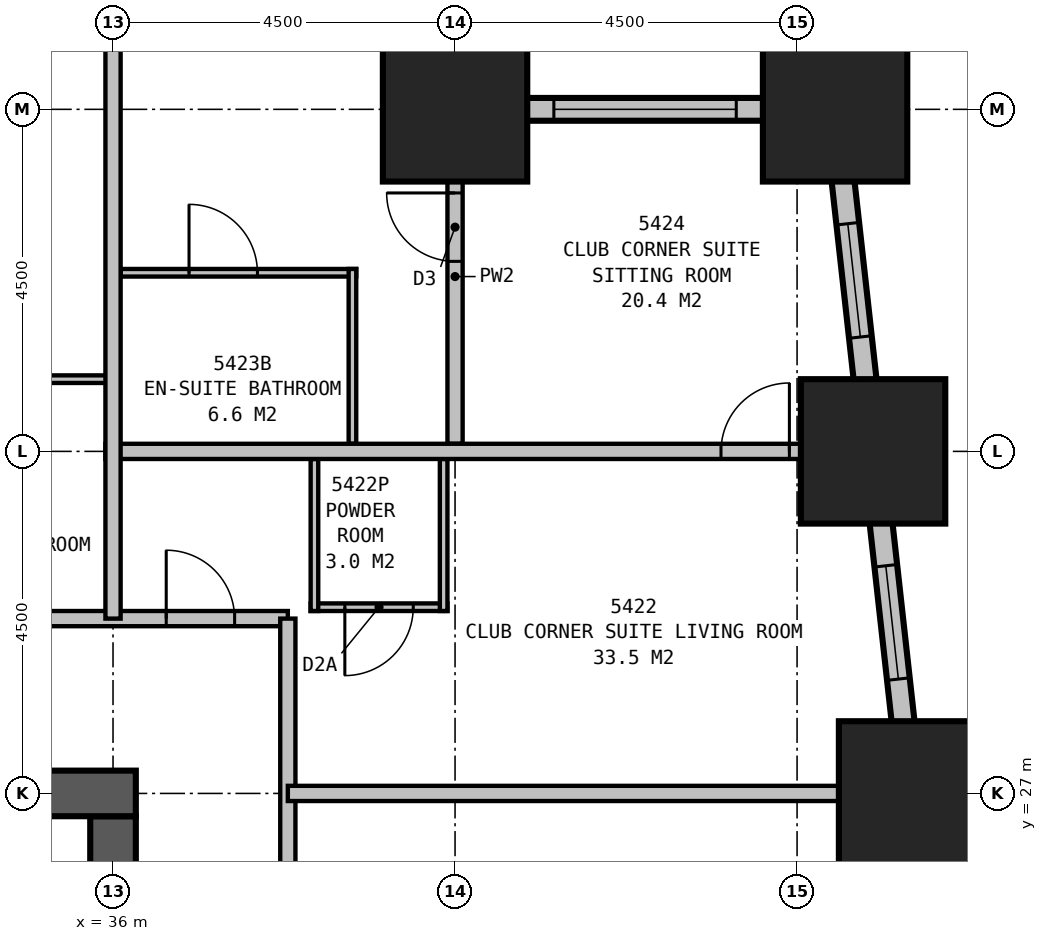
"""IFC4 building model, lengths in metres.
Left out: names, types, materials, properties, quantities, classifications, styles, units other than length and angle.
Written with IfcOpenShell. Run it as: python <this file> out.ifc"""

import sys

from ifc_helpers import new_model, si_unit, direction, frame, frame_2d, origin, origin_2d, place, context, subcontext, project, spatial, rectangle, extrude, element, fill, save


model = new_model("IFC4")
c1 = context("Model", 3, precision=1e-05, world=origin(), true_north=direction((0.0, 1.0)))
c2 = subcontext(c1, "Body", "Model", "MODEL_VIEW")
j1 = project(units=[si_unit("LENGTHUNIT", "METRE"), si_unit("PLANEANGLEUNIT", "RADIAN")], contexts=[c1])
p1 = place(None, origin())
s1 = spatial("IfcSite", under=j1, at=p1, CompositionType="ELEMENT")
p2 = place(p1, origin())
s2 = spatial("IfcBuilding", under=s1, at=p2, CompositionType="ELEMENT")
p3 = place(p2, frame((0.0, 0.0, 207.9)))
s3 = spatial("IfcBuildingStorey", under=s2, at=p3, CompositionType="ELEMENT", Elevation=207.9)
for number, where, z_axis, x_axis in (
    (1, (46.5, 27.0, 0.0), (0.0, 0.0, 1.0), (1.0, 0.0, 0.0)),
    (2, (46.0, 31.5, 0.0), (0.0, 0.0, 1.0), (1.0, 0.0, 0.0)),
    (3, (45.5, 36.0, 0.0), (0.0, 0.0, 1.0), (1.0, 0.0, 0.0)),
    (4, (40.5, 36.0, 0.0), (0.0, 0.0, 1.0), (1.0, 0.0, 0.0)),
):
    element("IfcColumn", number, at=place(p3, frame(where, z_axis=z_axis, x_axis=x_axis)), inside=s3, PredefinedType="COLUMN", context=c2, shape_type="SweptSolid", body=[
        extrude(rectangle(XDim=1.9, YDim=1.9, at=origin_2d()), origin(), (0.0, 0.0, 1.0), 3.5),
    ])
p4 = place(p3, frame((36.3, 27.0, 0.0), z_axis=(0.0, 0.0, 1.0), x_axis=(-1.0, 0.0, 0.0)))
e5 = element("IfcWall", 5, at=p4, inside=s3, PredefinedType="SHEAR", context=c2, shape_type="SweptSolid", body=[
    extrude(rectangle(XDim=23.1, YDim=0.6, at=frame_2d((11.55, 0.0))), origin(), (0.0, 0.0, 1.0), 3.5),
])
p5 = place(p4, frame((17.05, 0.0, 0.0)))
e6 = element("IfcOpeningElement", 6, at=p5, cuts=e5, PredefinedType="OPENING", context=c2, shape_type="SweptSolid", body=[
    extrude(rectangle(XDim=1.0, YDim=2.1, at=frame_2d((0.5, 1.05))), frame((0.0, 0.31, 0.0), z_axis=(0.0, -1.0, 0.0), x_axis=(1.0, 0.0, 0.0)), (0.0, 0.0, 1.0), 0.62),
])
p6 = place(p4, frame((12.05, 0.0, 0.0)))
e7 = element("IfcOpeningElement", 7, at=p6, cuts=e5, PredefinedType="OPENING", context=c2, shape_type="SweptSolid", body=[
    extrude(rectangle(XDim=1.0, YDim=2.1, at=frame_2d((0.5, 1.05))), frame((0.0, 0.31, 0.0), z_axis=(0.0, -1.0, 0.0), x_axis=(1.0, 0.0, 0.0)), (0.0, 0.0, 1.0), 0.62),
])
p7 = place(p4, frame((7.05, 0.0, 0.0)))
e8 = element("IfcOpeningElement", 8, at=p7, cuts=e5, PredefinedType="OPENING", context=c2, shape_type="SweptSolid", body=[
    extrude(rectangle(XDim=1.0, YDim=2.1, at=frame_2d((0.5, 1.05))), frame((0.0, 0.31, 0.0), z_axis=(0.0, -1.0, 0.0), x_axis=(1.0, 0.0, 0.0)), (0.0, 0.0, 1.0), 0.62),
])
p8 = place(p3, frame((36.0, 20.0, 0.0), z_axis=(0.0, 0.0, 1.0), x_axis=(0.0, 1.0, 0.0)))
e9 = element("IfcWall", 9, at=p8, inside=s3, PredefinedType="SHEAR", context=c2, shape_type="SweptSolid", body=[
    extrude(rectangle(XDim=6.7, YDim=0.6, at=frame_2d((3.35, 0.0))), origin(), (0.0, 0.0, 1.0), 3.5),
])
p9 = place(p3, frame((49.017, 4.351, 0.0), z_axis=(0.0, 0.0, 1.0), x_axis=(-0.110433201132, 0.993883548555, 0.0)))
e10 = element("IfcWall", 10, at=p9, inside=s3, PredefinedType="STANDARD", context=c2, shape_type="SweptSolid", body=[
    extrude(rectangle(XDim=31.994, YDim=0.3, at=frame_2d((15.997, 0.0))), origin(), (0.0, 0.0, 1.0), 1.9),
])
p10 = place(p9, frame((1.664, 0.0, 0.5)))
e11 = element("IfcOpeningElement", 11, at=p10, cuts=e10, PredefinedType="OPENING", context=c2, shape_type="SweptSolid", body=[
    extrude(rectangle(XDim=1.5, YDim=1.2, at=frame_2d((0.75, 0.6))), frame((0.0, 0.16, 0.0), z_axis=(0.0, -1.0, 0.0), x_axis=(1.0, 0.0, 0.0)), (0.0, 0.0, 1.0), 0.32),
])
p11 = place(p9, frame((6.192, 0.0, 0.5)))
e12 = element("IfcOpeningElement", 12, at=p11, cuts=e10, PredefinedType="OPENING", context=c2, shape_type="SweptSolid", body=[
    extrude(rectangle(XDim=1.5, YDim=1.2, at=frame_2d((0.75, 0.6))), frame((0.0, 0.16, 0.0), z_axis=(0.0, -1.0, 0.0), x_axis=(1.0, 0.0, 0.0)), (0.0, 0.0, 1.0), 0.32),
])
p12 = place(p9, frame((10.719, 0.0, 0.5)))
e13 = element("IfcOpeningElement", 13, at=p12, cuts=e10, PredefinedType="OPENING", context=c2, shape_type="SweptSolid", body=[
    extrude(rectangle(XDim=1.5, YDim=1.2, at=frame_2d((0.75, 0.6))), frame((0.0, 0.16, 0.0), z_axis=(0.0, -1.0, 0.0), x_axis=(1.0, 0.0, 0.0)), (0.0, 0.0, 1.0), 0.32),
])
p13 = place(p9, frame((15.247, 0.0, 0.5)))
e14 = element("IfcOpeningElement", 14, at=p13, cuts=e10, PredefinedType="OPENING", context=c2, shape_type="SweptSolid", body=[
    extrude(rectangle(XDim=1.5, YDim=1.2, at=frame_2d((0.75, 0.6))), frame((0.0, 0.16, 0.0), z_axis=(0.0, -1.0, 0.0), x_axis=(1.0, 0.0, 0.0)), (0.0, 0.0, 1.0), 0.32),
])
p14 = place(p9, frame((19.775, 0.0, 0.5)))
e15 = element("IfcOpeningElement", 15, at=p14, cuts=e10, PredefinedType="OPENING", context=c2, shape_type="SweptSolid", body=[
    extrude(rectangle(XDim=1.5, YDim=1.2, at=frame_2d((0.75, 0.6))), frame((0.0, 0.16, 0.0), z_axis=(0.0, -1.0, 0.0), x_axis=(1.0, 0.0, 0.0)), (0.0, 0.0, 1.0), 0.32),
])
p15 = place(p9, frame((24.302, 0.0, 0.5)))
e16 = element("IfcOpeningElement", 16, at=p15, cuts=e10, PredefinedType="OPENING", context=c2, shape_type="SweptSolid", body=[
    extrude(rectangle(XDim=1.5, YDim=1.2, at=frame_2d((0.75, 0.6))), frame((0.0, 0.16, 0.0), z_axis=(0.0, -1.0, 0.0), x_axis=(1.0, 0.0, 0.0)), (0.0, 0.0, 1.0), 0.32),
])
p16 = place(p9, frame((28.83, 0.0, 0.5)))
e17 = element("IfcOpeningElement", 17, at=p16, cuts=e10, PredefinedType="OPENING", context=c2, shape_type="SweptSolid", body=[
    extrude(rectangle(XDim=1.5, YDim=1.2, at=frame_2d((0.75, 0.6))), frame((0.0, 0.16, 0.0), z_axis=(0.0, -1.0, 0.0), x_axis=(1.0, 0.0, 0.0)), (0.0, 0.0, 1.0), 0.32),
])
p17 = place(p3, frame((45.65, 36.0, 0.0), z_axis=(0.0, 0.0, 1.0), x_axis=(-1.0, 0.0, 0.0)))
e18 = element("IfcWall", 18, at=p17, inside=s3, PredefinedType="STANDARD", context=c2, shape_type="SweptSolid", body=[
    extrude(rectangle(XDim=5.3, YDim=0.3, at=frame_2d((2.65, 0.0))), origin(), (0.0, 0.0, 1.0), 1.9),
])
p18 = place(p17, frame((1.45, 0.0, 0.5)))
e19 = element("IfcOpeningElement", 19, at=p18, cuts=e18, PredefinedType="OPENING", context=c2, shape_type="SweptSolid", body=[
    extrude(rectangle(XDim=2.4, YDim=1.2, at=frame_2d((1.2, 0.6))), frame((0.0, 0.16, 0.0), z_axis=(0.0, -1.0, 0.0), x_axis=(1.0, 0.0, 0.0)), (0.0, 0.0, 1.0), 0.32),
])
p19 = place(p3, frame((40.5, 35.85, 0.0), z_axis=(0.0, 0.0, 1.0), x_axis=(0.0, 1.0, 0.0)))
e20 = element("IfcWall", 20, at=p19, inside=s3, PredefinedType="STANDARD", context=c2, shape_type="SweptSolid", body=[
    extrude(rectangle(XDim=4.8, YDim=0.3, at=frame_2d((2.4, 0.0))), origin(), (0.0, 0.0, 1.0), 1.9),
])
p20 = place(p19, frame((1.65, 0.0, 0.5)))
e21 = element("IfcOpeningElement", 21, at=p20, cuts=e20, PredefinedType="OPENING", context=c2, shape_type="SweptSolid", body=[
    extrude(rectangle(XDim=1.5, YDim=1.2, at=frame_2d((0.75, 0.6))), frame((0.0, 0.16, 0.0), z_axis=(0.0, -1.0, 0.0), x_axis=(1.0, 0.0, 0.0)), (0.0, 0.0, 1.0), 0.32),
])
p21 = place(p3, frame((11.2, 29.3, 0.0), z_axis=(0.0, 0.0, 1.0), x_axis=(1.0, 0.0, 0.0)))
e22 = element("IfcWall", 22, at=p21, inside=s3, PredefinedType="PARTITIONING", context=c2, shape_type="SweptSolid", body=[
    extrude(rectangle(XDim=27.1, YDim=0.2, at=frame_2d((13.55, 0.0))), origin(), (0.0, 0.0, 1.0), 3.25),
])
p22 = place(p21, frame((3.15, 0.0, 0.0)))
e23 = element("IfcOpeningElement", 23, at=p22, cuts=e22, PredefinedType="OPENING", context=c2, shape_type="SweptSolid", body=[
    extrude(rectangle(XDim=0.9, YDim=2.1, at=frame_2d((0.45, 1.05))), frame((0.0, 0.11, 0.0), z_axis=(0.0, -1.0, 0.0), x_axis=(1.0, 0.0, 0.0)), (0.0, 0.0, 1.0), 0.22),
])
p23 = place(p21, frame((16.65, 0.0, 0.0)))
e24 = element("IfcOpeningElement", 24, at=p23, cuts=e22, PredefinedType="OPENING", context=c2, shape_type="SweptSolid", body=[
    extrude(rectangle(XDim=0.9, YDim=2.1, at=frame_2d((0.45, 1.05))), frame((0.0, 0.11, 0.0), z_axis=(0.0, -1.0, 0.0), x_axis=(1.0, 0.0, 0.0)), (0.0, 0.0, 1.0), 0.22),
])
p24 = place(p21, frame((25.5, 0.0, 0.0)))
e25 = element("IfcOpeningElement", 25, at=p24, cuts=e22, PredefinedType="OPENING", context=c2, shape_type="SweptSolid", body=[
    extrude(rectangle(XDim=0.9, YDim=2.1, at=frame_2d((0.45, 1.05))), frame((0.0, 0.11, 0.0), z_axis=(0.0, -1.0, 0.0), x_axis=(1.0, 0.0, 0.0)), (0.0, 0.0, 1.0), 0.22),
])
p25 = place(p21, frame((0.7, 0.0, 0.0)))
e26 = element("IfcOpeningElement", 26, at=p25, cuts=e22, PredefinedType="OPENING", context=c2, shape_type="SweptSolid", body=[
    extrude(rectangle(XDim=0.9, YDim=2.1, at=frame_2d((0.45, 1.05))), frame((0.0, 0.11, 0.0), z_axis=(0.0, -1.0, 0.0), x_axis=(1.0, 0.0, 0.0)), (0.0, 0.0, 1.0), 0.22),
])
p26 = place(p3, frame((38.3, 10.6, 0.0), z_axis=(0.0, 0.0, 1.0), x_axis=(0.0, 1.0, 0.0)))
e27 = element("IfcWall", 27, at=p26, inside=s3, PredefinedType="PARTITIONING", context=c2, shape_type="SweptSolid", body=[
    extrude(rectangle(XDim=18.7, YDim=0.2, at=frame_2d((9.35, 0.0))), origin(), (0.0, 0.0, 1.0), 3.25),
])
p27 = place(p26, frame((6.95, 0.0, 0.0), z_axis=(0.0, 0.0, 1.0), x_axis=(-1.0, 0.0, 0.0)))
e28 = element("IfcOpeningElement", 28, at=p27, cuts=e27, PredefinedType="OPENING", context=c2, shape_type="SweptSolid", body=[
    extrude(rectangle(XDim=0.9, YDim=2.1, at=frame_2d((0.45, 1.05))), frame((0.0, 0.11, 0.0), z_axis=(0.0, -1.0, 0.0), x_axis=(1.0, 0.0, 0.0)), (0.0, 0.0, 1.0), 0.22),
])
p28 = place(p26, frame((10.9, 0.0, 0.0), z_axis=(0.0, 0.0, 1.0), x_axis=(-1.0, 0.0, 0.0)))
e29 = element("IfcOpeningElement", 29, at=p28, cuts=e27, PredefinedType="OPENING", context=c2, shape_type="SweptSolid", body=[
    extrude(rectangle(XDim=0.9, YDim=2.1, at=frame_2d((0.45, 1.05))), frame((0.0, 0.11, 0.0), z_axis=(0.0, -1.0, 0.0), x_axis=(1.0, 0.0, 0.0)), (0.0, 0.0, 1.0), 0.22),
])
p29 = place(p3, frame((32.85, 32.45, 0.0), z_axis=(0.0, 0.0, 1.0), x_axis=(1.0, 0.0, 0.0)))
e30 = element("IfcWall", 30, at=p29, inside=s3, PredefinedType="PLUMBINGWALL", context=c2, shape_type="SweptSolid", body=[
    extrude(rectangle(XDim=3.15, YDim=0.1, at=frame_2d((1.575, 0.0))), origin(), (0.0, 0.0, 1.0), 3.25),
])
p30 = place(p3, frame((38.3, 27.0, 0.0), z_axis=(0.0, 0.0, 1.0), x_axis=(1.0, 0.0, 0.0)))
e31 = element("IfcWall", 31, at=p30, inside=s3, PredefinedType="PARTITIONING", context=c2, shape_type="SweptSolid", body=[
    extrude(rectangle(XDim=7.977, YDim=0.2, at=frame_2d((3.988, 0.0))), origin(), (0.0, 0.0, 1.0), 1.9),
])
p31 = place(p3, frame((36.0, 29.3, 0.0), z_axis=(0.0, 0.0, 1.0), x_axis=(0.0, 1.0, 0.0)))
e32 = element("IfcWall", 32, at=p31, inside=s3, PredefinedType="PARTITIONING", context=c2, shape_type="SweptSolid", body=[
    extrude(rectangle(XDim=11.2, YDim=0.2, at=frame_2d((5.6, 0.0))), origin(), (0.0, 0.0, 1.0), 2.2),
])
p32 = place(p3, frame((35.9, 31.5, 0.0), z_axis=(0.0, 0.0, 1.0), x_axis=(1.0, 0.0, 0.0)))
e33 = element("IfcWall", 33, at=p32, inside=s3, PredefinedType="PARTITIONING", context=c2, shape_type="SweptSolid", body=[
    extrude(rectangle(XDim=10.099, YDim=0.2, at=frame_2d((5.05, 0.0))), origin(), (0.0, 0.0, 1.0), 3.25),
])
p33 = place(p32, frame((8.099, 0.0, 0.0)))
e34 = element("IfcOpeningElement", 34, at=p33, cuts=e33, PredefinedType="OPENING", context=c2, shape_type="SweptSolid", body=[
    extrude(rectangle(XDim=0.9, YDim=2.1, at=frame_2d((0.45, 1.05))), frame((0.0, 0.11, 0.0), z_axis=(0.0, -1.0, 0.0), x_axis=(1.0, 0.0, 0.0)), (0.0, 0.0, 1.0), 0.22),
])
p34 = place(p3, frame((40.35, 31.4, 0.0), z_axis=(0.0, 0.0, 1.0), x_axis=(0.0, -1.0, 0.0)))
e35 = element("IfcWall", 35, at=p34, inside=s3, PredefinedType="PLUMBINGWALL", context=c2, shape_type="SweptSolid", body=[
    extrude(rectangle(XDim=2.0, YDim=0.1, at=frame_2d((1.0, 0.0))), origin(), (0.0, 0.0, 1.0), 2.2),
])
p35 = place(p3, frame((38.65, 31.4, 0.0), z_axis=(0.0, 0.0, 1.0), x_axis=(0.0, -1.0, 0.0)))
e36 = element("IfcWall", 36, at=p35, inside=s3, PredefinedType="PLUMBINGWALL", context=c2, shape_type="SweptSolid", body=[
    extrude(rectangle(XDim=2.0, YDim=0.1, at=frame_2d((1.0, 0.0))), origin(), (0.0, 0.0, 1.0), 3.25),
])
p36 = place(p3, frame((38.6, 29.45, 0.0), z_axis=(0.0, 0.0, 1.0), x_axis=(1.0, 0.0, 0.0)))
e37 = element("IfcWall", 37, at=p36, inside=s3, PredefinedType="PLUMBINGWALL", context=c2, shape_type="SweptSolid", body=[
    extrude(rectangle(XDim=1.8, YDim=0.1, at=frame_2d((0.9, 0.0))), origin(), (0.0, 0.0, 1.0), 3.25),
])
p37 = place(p36, frame((1.35, 0.0, 0.0), z_axis=(0.0, 0.0, 1.0), x_axis=(-1.0, 0.0, 0.0)))
e38 = element("IfcOpeningElement", 38, at=p37, cuts=e37, PredefinedType="OPENING", context=c2, shape_type="SweptSolid", body=[
    extrude(rectangle(XDim=0.9, YDim=2.1, at=frame_2d((0.45, 1.05))), frame((0.0, 0.06, 0.0), z_axis=(0.0, -1.0, 0.0), x_axis=(1.0, 0.0, 0.0)), (0.0, 0.0, 1.0), 0.12),
])
p38 = place(p3, frame((40.5, 31.6, 0.0), z_axis=(0.0, 0.0, 1.0), x_axis=(0.0, 1.0, 0.0)))
e39 = element("IfcWall", 39, at=p38, inside=s3, PredefinedType="PARTITIONING", context=c2, shape_type="SweptSolid", body=[
    extrude(rectangle(XDim=4.4, YDim=0.2, at=frame_2d((2.2, 0.0))), origin(), (0.0, 0.0, 1.0), 2.2),
])
p39 = place(p38, frame((2.4, 0.0, 0.0)))
e40 = element("IfcOpeningElement", 40, at=p39, cuts=e39, PredefinedType="OPENING", context=c2, shape_type="SweptSolid", body=[
    extrude(rectangle(XDim=0.9, YDim=2.1, at=frame_2d((0.45, 1.05))), frame((0.0, 0.11, 0.0), z_axis=(0.0, -1.0, 0.0), x_axis=(1.0, 0.0, 0.0)), (0.0, 0.0, 1.0), 0.22),
])
p40 = place(p3, frame((39.15, 31.6, 0.0), z_axis=(0.0, 0.0, 1.0), x_axis=(0.0, 1.0, 0.0)))
e41 = element("IfcWall", 41, at=p40, inside=s3, PredefinedType="PLUMBINGWALL", context=c2, shape_type="SweptSolid", body=[
    extrude(rectangle(XDim=2.3, YDim=0.1, at=frame_2d((1.15, 0.0))), origin(), (0.0, 0.0, 1.0), 3.25),
])
p41 = place(p3, frame((36.1, 33.85, 0.0), z_axis=(0.0, 0.0, 1.0), x_axis=(1.0, 0.0, 0.0)))
e42 = element("IfcWall", 42, at=p41, inside=s3, PredefinedType="PLUMBINGWALL", context=c2, shape_type="SweptSolid", body=[
    extrude(rectangle(XDim=3.1, YDim=0.1, at=frame_2d((1.55, 0.0))), origin(), (0.0, 0.0, 1.0), 3.25),
])
p42 = place(p41, frame((0.9, 0.0, 0.0)))
e43 = element("IfcOpeningElement", 43, at=p42, cuts=e42, PredefinedType="OPENING", context=c2, shape_type="SweptSolid", body=[
    extrude(rectangle(XDim=0.9, YDim=2.1, at=frame_2d((0.45, 1.05))), frame((0.0, 0.06, 0.0), z_axis=(0.0, -1.0, 0.0), x_axis=(1.0, 0.0, 0.0)), (0.0, 0.0, 1.0), 0.12),
])
p43 = place(p15, origin())
e44 = element("IfcWindow", 44, at=p43, inside=s3, PartitioningType="SINGLE_PANEL", PredefinedType="WINDOW", context=c2, shape_type="SweptSolid", body=[
    extrude(rectangle(XDim=1.5, YDim=1.2, at=frame_2d((0.75, 0.6))), frame((0.0, 0.03, 0.0), z_axis=(0.0, -1.0, 0.0), x_axis=(1.0, 0.0, 0.0)), (0.0, 0.0, 1.0), 0.06),
])
fill(e16, e44)
p44 = place(p16, origin())
e45 = element("IfcWindow", 45, at=p44, inside=s3, PartitioningType="SINGLE_PANEL", PredefinedType="WINDOW", context=c2, shape_type="SweptSolid", body=[
    extrude(rectangle(XDim=1.5, YDim=1.2, at=frame_2d((0.75, 0.6))), frame((0.0, 0.03, 0.0), z_axis=(0.0, -1.0, 0.0), x_axis=(1.0, 0.0, 0.0)), (0.0, 0.0, 1.0), 0.06),
])
fill(e17, e45)
p45 = place(p18, origin())
e46 = element("IfcWindow", 46, at=p45, inside=s3, PartitioningType="SINGLE_PANEL", PredefinedType="WINDOW", context=c2, shape_type="SweptSolid", body=[
    extrude(rectangle(XDim=2.4, YDim=1.2, at=frame_2d((1.2, 0.6))), frame((0.0, 0.03, 0.0), z_axis=(0.0, -1.0, 0.0), x_axis=(1.0, 0.0, 0.0)), (0.0, 0.0, 1.0), 0.06),
])
fill(e19, e46)
p46 = place(p24, origin())
e47 = element("IfcDoor", 47, at=p46, inside=s3, OperationType="SINGLE_SWING_LEFT", PredefinedType="DOOR", context=c2, shape_type="SweptSolid", body=[
    extrude(rectangle(XDim=0.9, YDim=2.1, at=frame_2d((0.45, 1.05))), frame((0.0, 0.025, 0.0), z_axis=(0.0, -1.0, 0.0), x_axis=(1.0, 0.0, 0.0)), (0.0, 0.0, 1.0), 0.05),
])
fill(e25, e47)
p47 = place(p33, origin())
e48 = element("IfcDoor", 48, at=p47, inside=s3, OperationType="SINGLE_SWING_RIGHT", PredefinedType="DOOR", context=c2, shape_type="SweptSolid", body=[
    extrude(rectangle(XDim=0.9, YDim=2.1, at=frame_2d((0.45, 1.05))), frame((0.0, 0.025, 0.0), z_axis=(0.0, -1.0, 0.0), x_axis=(1.0, 0.0, 0.0)), (0.0, 0.0, 1.0), 0.05),
])
fill(e34, e48)
p48 = place(p37, origin())
e49 = element("IfcDoor", 49, at=p48, inside=s3, OperationType="SINGLE_SWING_RIGHT", PredefinedType="DOOR", context=c2, shape_type="SweptSolid", body=[
    extrude(rectangle(XDim=0.9, YDim=2.1, at=frame_2d((0.45, 1.05))), frame((0.0, 0.025, 0.0), z_axis=(0.0, -1.0, 0.0), x_axis=(1.0, 0.0, 0.0)), (0.0, 0.0, 1.0), 0.05),
])
fill(e38, e49)
p49 = place(p39, origin())
e50 = element("IfcDoor", 50, at=p49, inside=s3, OperationType="SINGLE_SWING_RIGHT", PredefinedType="DOOR", context=c2, shape_type="SweptSolid", body=[
    extrude(rectangle(XDim=0.9, YDim=2.1, at=frame_2d((0.45, 1.05))), frame((0.0, 0.025, 0.0), z_axis=(0.0, -1.0, 0.0), x_axis=(1.0, 0.0, 0.0)), (0.0, 0.0, 1.0), 0.05),
])
fill(e40, e50)
p50 = place(p42, origin())
e51 = element("IfcDoor", 51, at=p50, inside=s3, OperationType="SINGLE_SWING_LEFT", PredefinedType="DOOR", context=c2, shape_type="SweptSolid", body=[
    extrude(rectangle(XDim=0.9, YDim=2.1, at=frame_2d((0.45, 1.05))), frame((0.0, 0.025, 0.0), z_axis=(0.0, -1.0, 0.0), x_axis=(1.0, 0.0, 0.0)), (0.0, 0.0, 1.0), 0.05),
])
fill(e43, e51)
save(model, sys.argv[1])
